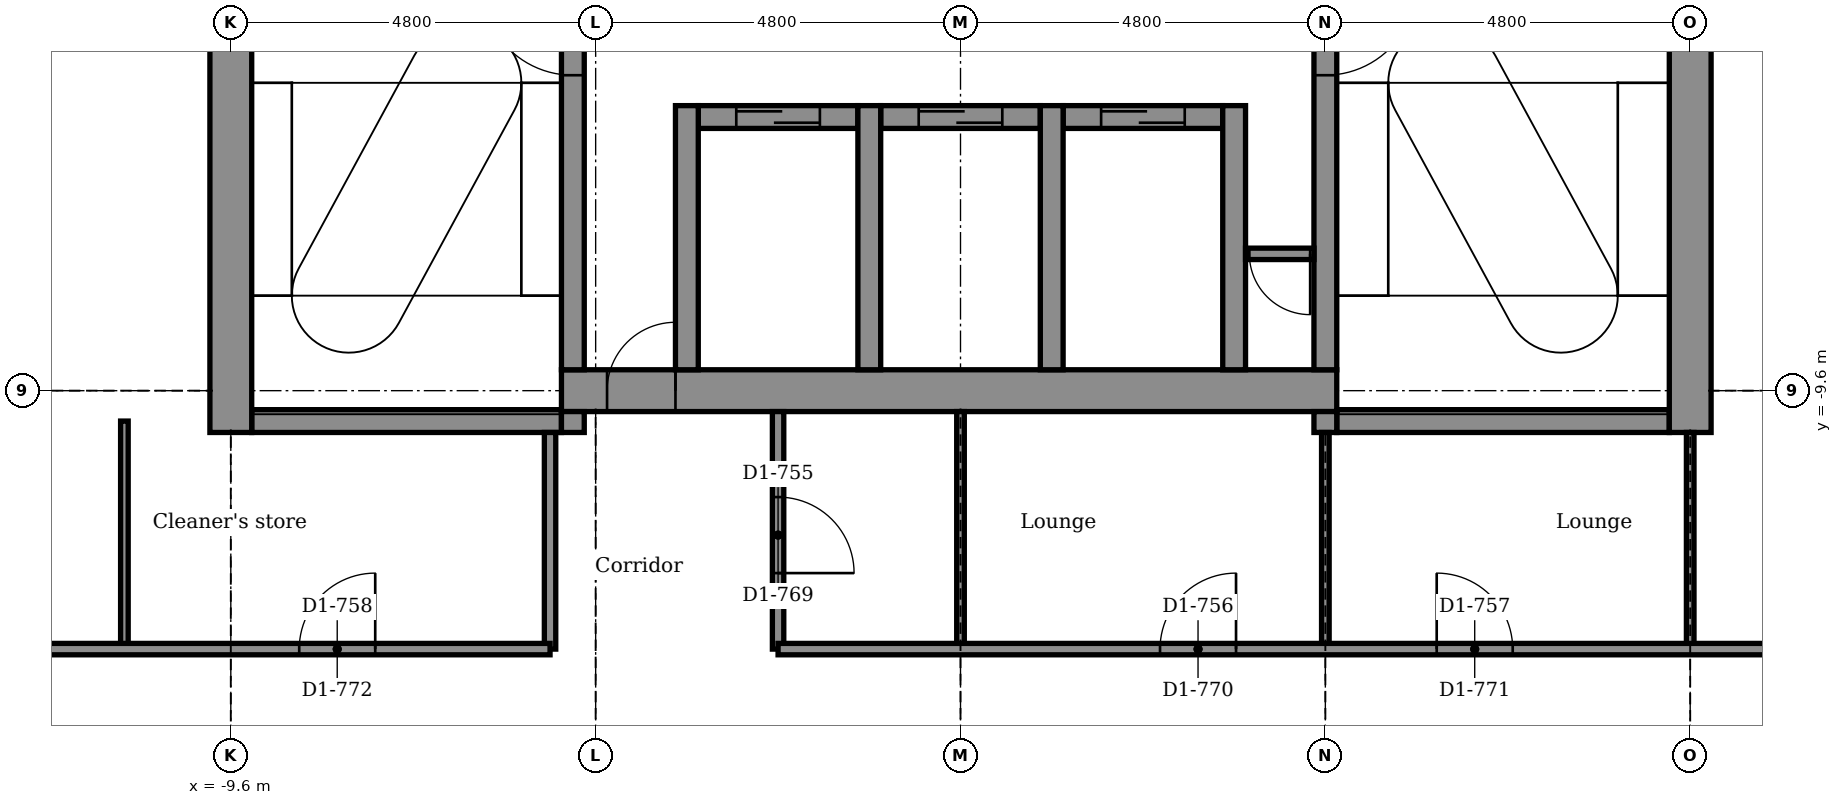
"""IFC4 building model, lengths in metres.
Left out: names, types, materials, properties, quantities, classifications, styles, units other than length and angle.
Written with IfcOpenShell. Run it as: python <this file> out.ifc"""

import sys

from ifc_helpers import new_model, si_unit, direction, frame, frame_2d, origin, place, context, subcontext, project, spatial, rectangle, extrude, element, fill, save


model = new_model("IFC4")
c1 = context("Model", 3, precision=1e-05, world=origin(), true_north=direction((0.0, 1.0)))
c2 = subcontext(c1, "Body", "Model", "MODEL_VIEW")
j1 = project(units=[si_unit("LENGTHUNIT", "METRE"), si_unit("PLANEANGLEUNIT", "RADIAN")], contexts=[c1])
p1 = place(None, origin())
s1 = spatial("IfcSite", under=j1, at=p1, CompositionType="ELEMENT")
p2 = place(p1, origin())
s2 = spatial("IfcBuilding", under=s1, at=p2, CompositionType="ELEMENT")
p3 = place(p2, frame((0.0, 0.0, 289.1)))
s3 = spatial("IfcBuildingStorey", under=s2, at=p3, CompositionType="ELEMENT", Elevation=289.1)
p4 = place(p3, frame((-9.325, -10.0, -0.15), z_axis=(0.0, 0.0, 1.0), x_axis=(1.0, 0.0, 0.0)))
e1 = element("IfcWall", 1, at=p4, inside=s3, PredefinedType="STANDARD", context=c2, shape_type="SweptSolid", body=[
    extrude(rectangle(XDim=4.075, YDim=0.3, at=frame_2d((2.038, 0.0))), origin(), (0.0, 0.0, 1.0), 3.9),
])
p5 = place(p3, frame((4.95, -10.0, -0.15), z_axis=(0.0, 0.0, 1.0), x_axis=(1.0, 0.0, 0.0)))
e2 = element("IfcWall", 2, at=p5, inside=s3, PredefinedType="STANDARD", context=c2, shape_type="SweptSolid", body=[
    extrude(rectangle(XDim=4.375, YDim=0.3, at=frame_2d((2.188, 0.0))), origin(), (0.0, 0.0, 1.0), 3.9),
])
p6 = place(p3, frame((-5.25, -9.6, -0.15), z_axis=(0.0, 0.0, 1.0), x_axis=(1.0, 0.0, 0.0)))
e3 = element("IfcWall", 3, at=p6, inside=s3, PredefinedType="SHEAR", context=c2, shape_type="SweptSolid", body=[
    extrude(rectangle(XDim=10.2, YDim=0.55, at=frame_2d((5.1, 0.0))), origin(), (0.0, 0.0, 1.0), 3.9),
])
p7 = place(p6, frame((0.6, 0.0, 0.15)))
e4 = element("IfcOpeningElement", 4, at=p7, cuts=e3, PredefinedType="OPENING", context=c2, shape_type="SweptSolid", body=[
    extrude(rectangle(XDim=0.9, YDim=2.1, at=frame_2d((0.45, 1.05))), frame((0.0, 0.285, 0.0), z_axis=(0.0, -1.0, 0.0), x_axis=(1.0, 0.0, 0.0)), (0.0, 0.0, 1.0), 0.57),
])
p8 = place(p3, frame((-3.45, -6.0, -0.15), z_axis=(0.0, 0.0, 1.0), x_axis=(1.0, 0.0, 0.0)))
e5 = element("IfcWall", 5, at=p8, inside=s3, PredefinedType="STANDARD", context=c2, shape_type="SweptSolid", body=[
    extrude(rectangle(XDim=2.1, YDim=0.3, at=frame_2d((1.05, 0.0))), origin(), (0.0, 0.0, 1.0), 3.9),
])
p9 = place(p8, frame((0.5, 0.0, 0.15)))
e6 = element("IfcOpeningElement", 6, at=p9, cuts=e5, PredefinedType="OPENING", context=c2, shape_type="SweptSolid", body=[
    extrude(rectangle(XDim=1.1, YDim=2.1, at=frame_2d((0.55, 1.05))), frame((0.0, 0.16, 0.0), z_axis=(0.0, -1.0, 0.0), x_axis=(1.0, 0.0, 0.0)), (0.0, 0.0, 1.0), 0.32),
])
p10 = place(p3, frame((-1.05, -6.0, -0.15), z_axis=(0.0, 0.0, 1.0), x_axis=(1.0, 0.0, 0.0)))
e7 = element("IfcWall", 7, at=p10, inside=s3, PredefinedType="STANDARD", context=c2, shape_type="SweptSolid", body=[
    extrude(rectangle(XDim=2.1, YDim=0.3, at=frame_2d((1.05, 0.0))), origin(), (0.0, 0.0, 1.0), 3.9),
])
p11 = place(p10, frame((0.5, 0.0, 0.15)))
e8 = element("IfcOpeningElement", 8, at=p11, cuts=e7, PredefinedType="OPENING", context=c2, shape_type="SweptSolid", body=[
    extrude(rectangle(XDim=1.1, YDim=2.1, at=frame_2d((0.55, 1.05))), frame((0.0, 0.16, 0.0), z_axis=(0.0, -1.0, 0.0), x_axis=(1.0, 0.0, 0.0)), (0.0, 0.0, 1.0), 0.32),
])
p12 = place(p3, frame((1.35, -6.0, -0.15), z_axis=(0.0, 0.0, 1.0), x_axis=(1.0, 0.0, 0.0)))
e9 = element("IfcWall", 9, at=p12, inside=s3, PredefinedType="STANDARD", context=c2, shape_type="SweptSolid", body=[
    extrude(rectangle(XDim=2.1, YDim=0.3, at=frame_2d((1.05, 0.0))), origin(), (0.0, 0.0, 1.0), 3.9),
])
p13 = place(p12, frame((0.5, 0.0, 0.15)))
e10 = element("IfcOpeningElement", 10, at=p13, cuts=e9, PredefinedType="OPENING", context=c2, shape_type="SweptSolid", body=[
    extrude(rectangle(XDim=1.1, YDim=2.1, at=frame_2d((0.55, 1.05))), frame((0.0, 0.16, 0.0), z_axis=(0.0, -1.0, 0.0), x_axis=(1.0, 0.0, 0.0)), (0.0, 0.0, 1.0), 0.32),
])
p14 = place(p3, frame((-9.6, -10.15, -0.15), z_axis=(0.0, 0.0, 1.0), x_axis=(0.0, 1.0, 0.0)))
e11 = element("IfcWall", 11, at=p14, inside=s3, PredefinedType="SHEAR", context=c2, shape_type="SweptSolid", body=[
    extrude(rectangle(XDim=7.6, YDim=0.55, at=frame_2d((3.8, 0.0))), origin(), (0.0, 0.0, 1.0), 3.9),
])
p15 = place(p3, frame((-5.1, -10.15, -0.15), z_axis=(0.0, 0.0, 1.0), x_axis=(0.0, 1.0, 0.0)))
e12 = element("IfcWall", 12, at=p15, inside=s3, PredefinedType="STANDARD", context=c2, shape_type="SweptSolid", body=[
    extrude(rectangle(XDim=0.275, YDim=0.3, at=frame_2d((0.137, 0.0))), origin(), (0.0, 0.0, 1.0), 3.9),
])
p16 = place(p3, frame((-5.1, -9.325, -0.15), z_axis=(0.0, 0.0, 1.0), x_axis=(0.0, 1.0, 0.0)))
e13 = element("IfcWall", 13, at=p16, inside=s3, PredefinedType="STANDARD", context=c2, shape_type="SweptSolid", body=[
    extrude(rectangle(XDim=7.075, YDim=0.3, at=frame_2d((3.538, 0.0))), origin(), (0.0, 0.0, 1.0), 3.9),
])
p17 = place(p16, frame((3.875, 0.0, 0.15)))
e14 = element("IfcOpeningElement", 14, at=p17, cuts=e13, PredefinedType="OPENING", context=c2, shape_type="SweptSolid", body=[
    extrude(rectangle(XDim=1.2, YDim=2.1, at=frame_2d((0.6, 1.05))), frame((0.0, 0.16, 0.0), z_axis=(0.0, -1.0, 0.0), x_axis=(1.0, 0.0, 0.0)), (0.0, 0.0, 1.0), 0.32),
])
for number, where, z_axis, x_axis in (
    (15, (-3.6, -9.325, -0.15), (0.0, 0.0, 1.0), (0.0, 1.0, 0.0)),
    (16, (-1.2, -9.325, -0.15), (0.0, 0.0, 1.0), (0.0, 1.0, 0.0)),
    (17, (1.2, -9.325, -0.15), (0.0, 0.0, 1.0), (0.0, 1.0, 0.0)),
    (18, (3.6, -9.325, -0.15), (0.0, 0.0, 1.0), (0.0, 1.0, 0.0)),
):
    element("IfcWall", number, at=place(p3, frame(where, z_axis=z_axis, x_axis=x_axis)), inside=s3, PredefinedType="STANDARD", context=c2, shape_type="SweptSolid", body=[
        extrude(rectangle(XDim=3.475, YDim=0.3, at=frame_2d((1.737, 0.0))), origin(), (0.0, 0.0, 1.0), 3.9),
    ])
p18 = place(p3, frame((4.8, -10.15, -0.15), z_axis=(0.0, 0.0, 1.0), x_axis=(0.0, 1.0, 0.0)))
e19 = element("IfcWall", 19, at=p18, inside=s3, PredefinedType="STANDARD", context=c2, shape_type="SweptSolid", body=[
    extrude(rectangle(XDim=0.275, YDim=0.3, at=frame_2d((0.137, 0.0))), origin(), (0.0, 0.0, 1.0), 3.9),
])
p19 = place(p3, frame((4.8, -9.325, -0.15), z_axis=(0.0, 0.0, 1.0), x_axis=(0.0, 1.0, 0.0)))
e20 = element("IfcWall", 20, at=p19, inside=s3, PredefinedType="STANDARD", context=c2, shape_type="SweptSolid", body=[
    extrude(rectangle(XDim=7.075, YDim=0.3, at=frame_2d((3.538, 0.0))), origin(), (0.0, 0.0, 1.0), 3.9),
])
p20 = place(p19, frame((3.875, 0.0, 0.15)))
e21 = element("IfcOpeningElement", 21, at=p20, cuts=e20, PredefinedType="OPENING", context=c2, shape_type="SweptSolid", body=[
    extrude(rectangle(XDim=1.2, YDim=2.1, at=frame_2d((0.6, 1.05))), frame((0.0, 0.16, 0.0), z_axis=(0.0, -1.0, 0.0), x_axis=(1.0, 0.0, 0.0)), (0.0, 0.0, 1.0), 0.32),
])
p21 = place(p3, frame((9.6, -10.15, -0.15), z_axis=(0.0, 0.0, 1.0), x_axis=(0.0, 1.0, 0.0)))
e22 = element("IfcWall", 22, at=p21, inside=s3, PredefinedType="SHEAR", context=c2, shape_type="SweptSolid", body=[
    extrude(rectangle(XDim=20.075, YDim=0.55, at=frame_2d((10.038, 0.0))), origin(), (0.0, 0.0, 1.0), 3.9),
])
for number, where, z_axis, x_axis in (
    (23, (9.6, -13.0, 0.0), (0.0, 0.0, 1.0), (0.0, 1.0, 0.0)),
    (24, (4.8, -13.0, 0.0), (0.0, 0.0, 1.0), (0.0, 1.0, 0.0)),
):
    element("IfcWall", number, at=place(p3, frame(where, z_axis=z_axis, x_axis=x_axis)), inside=s3, PredefinedType="PARTITIONING", context=c2, shape_type="SweptSolid", body=[
        extrude(rectangle(XDim=2.85, YDim=0.1, at=frame_2d((1.425, 0.0))), origin(), (0.0, 0.0, 1.0), 3.293),
    ])
p22 = place(p3, frame((0.0, -13.0, 0.0), z_axis=(0.0, 0.0, 1.0), x_axis=(0.0, 1.0, 0.0)))
e25 = element("IfcWall", 25, at=p22, inside=s3, PredefinedType="PARTITIONING", context=c2, shape_type="SweptSolid", body=[
    extrude(rectangle(XDim=3.125, YDim=0.1, at=frame_2d((1.562, 0.0))), origin(), (0.0, 0.0, 1.0), 3.217),
])
p23 = place(p3, frame((-2.4, -13.0, 0.0), z_axis=(0.0, 0.0, 1.0), x_axis=(0.0, 1.0, 0.0)))
e26 = element("IfcWall", 26, at=p23, inside=s3, PredefinedType="PARTITIONING", context=c2, shape_type="SweptSolid", body=[
    extrude(rectangle(XDim=3.125, YDim=0.15, at=frame_2d((1.562, 0.0))), origin(), (0.0, 0.0, 1.0), 3.75),
])
p24 = place(p23, frame((1.0, 0.0, 0.0)))
e27 = element("IfcOpeningElement", 27, at=p24, cuts=e26, PredefinedType="OPENING", context=c2, shape_type="SweptSolid", body=[
    extrude(rectangle(XDim=1.0, YDim=2.1, at=frame_2d((0.5, 1.05))), frame((0.0, 0.085, 0.0), z_axis=(0.0, -1.0, 0.0), x_axis=(1.0, 0.0, 0.0)), (0.0, 0.0, 1.0), 0.17),
])
p25 = place(p3, frame((-5.4, -13.0, 0.0), z_axis=(0.0, 0.0, 1.0), x_axis=(0.0, 1.0, 0.0)))
e28 = element("IfcWall", 28, at=p25, inside=s3, PredefinedType="PARTITIONING", context=c2, shape_type="SweptSolid", body=[
    extrude(rectangle(XDim=2.85, YDim=0.15, at=frame_2d((1.425, 0.0))), origin(), (0.0, 0.0, 1.0), 3.75),
])
p26 = place(p3, frame((-11.0, -13.0, 0.0), z_axis=(0.0, 0.0, 1.0), x_axis=(0.0, 1.0, 0.0)))
e29 = element("IfcWall", 29, at=p26, inside=s3, PredefinedType="PARTITIONING", context=c2, shape_type="SweptSolid", body=[
    extrude(rectangle(XDim=3.0, YDim=0.1, at=frame_2d((1.5, 0.0))), origin(), (0.0, 0.0, 1.0), 3.75),
])
p27 = place(p3, frame((-14.624, -13.0, 0.0), z_axis=(0.0, 0.0, 1.0), x_axis=(1.0, 0.0, 0.0)))
e30 = element("IfcWall", 30, at=p27, inside=s3, PredefinedType="PARTITIONING", context=c2, shape_type="SweptSolid", body=[
    extrude(rectangle(XDim=9.224, YDim=0.15, at=frame_2d((4.612, 0.0))), origin(), (0.0, 0.0, 1.0), 3.75),
])
p28 = place(p27, frame((5.924, 0.0, 0.0)))
e31 = element("IfcOpeningElement", 31, at=p28, cuts=e30, PredefinedType="OPENING", context=c2, shape_type="SweptSolid", body=[
    extrude(rectangle(XDim=1.0, YDim=2.1, at=frame_2d((0.5, 1.05))), frame((0.0, 0.085, 0.0), z_axis=(0.0, -1.0, 0.0), x_axis=(1.0, 0.0, 0.0)), (0.0, 0.0, 1.0), 0.17),
])
p29 = place(p3, frame((-2.4, -13.0, 0.0), z_axis=(0.0, 0.0, 1.0), x_axis=(1.0, 0.0, 0.0)))
e32 = element("IfcWall", 32, at=p29, inside=s3, PredefinedType="PARTITIONING", context=c2, shape_type="SweptSolid", body=[
    extrude(rectangle(XDim=17.024, YDim=0.15, at=frame_2d((8.512, 0.0))), origin(), (0.0, 0.0, 1.0), 3.75),
])
p30 = place(p29, frame((5.025, 0.0, 0.0)))
e33 = element("IfcOpeningElement", 33, at=p30, cuts=e32, PredefinedType="OPENING", context=c2, shape_type="SweptSolid", body=[
    extrude(rectangle(XDim=1.0, YDim=2.1, at=frame_2d((0.5, 1.05))), frame((0.0, 0.085, 0.0), z_axis=(0.0, -1.0, 0.0), x_axis=(1.0, 0.0, 0.0)), (0.0, 0.0, 1.0), 0.17),
])
p31 = place(p29, frame((8.665, 0.0, 0.0)))
e34 = element("IfcOpeningElement", 34, at=p31, cuts=e32, PredefinedType="OPENING", context=c2, shape_type="SweptSolid", body=[
    extrude(rectangle(XDim=1.0, YDim=2.1, at=frame_2d((0.5, 1.05))), frame((0.0, 0.085, 0.0), z_axis=(0.0, -1.0, 0.0), x_axis=(1.0, 0.0, 0.0)), (0.0, 0.0, 1.0), 0.17),
])
p32 = place(p3, frame((3.75, -7.8, 0.0), z_axis=(0.0, 0.0, 1.0), x_axis=(1.0, 0.0, 0.0)))
e35 = element("IfcWall", 35, at=p32, inside=s3, PredefinedType="PARTITIONING", context=c2, shape_type="SweptSolid", body=[
    extrude(rectangle(XDim=0.9, YDim=0.15, at=frame_2d((0.45, 0.0))), origin(), (0.0, 0.0, 1.0), 3.75),
])
p33 = place(p32, frame((0.05, 0.0, 0.0)))
e36 = element("IfcOpeningElement", 36, at=p33, cuts=e35, PredefinedType="OPENING", context=c2, shape_type="SweptSolid", body=[
    extrude(rectangle(XDim=0.8, YDim=2.1, at=frame_2d((0.4, 1.05))), frame((0.0, 0.085, 0.0), z_axis=(0.0, -1.0, 0.0), x_axis=(1.0, 0.0, 0.0)), (0.0, 0.0, 1.0), 0.17),
])
p34 = place(p33, frame((0.8, 0.0, 0.0), z_axis=(0.0, 0.0, 1.0), x_axis=(-1.0, 0.0, 0.0)))
e37 = element("IfcDoor", 37, at=p34, inside=s3, OperationType="SINGLE_SWING_RIGHT", PredefinedType="DOOR", context=c2, shape_type="SweptSolid", body=[
    extrude(rectangle(XDim=0.8, YDim=2.1, at=frame_2d((0.4, 1.05))), frame((0.0, 0.025, 0.0), z_axis=(0.0, -1.0, 0.0), x_axis=(1.0, 0.0, 0.0)), (0.0, 0.0, 1.0), 0.05),
])
fill(e36, e37)
p35 = place(p24, frame((1.0, 0.0, 0.0), z_axis=(0.0, 0.0, 1.0), x_axis=(-1.0, 0.0, 0.0)))
e38 = element("IfcDoor", 38, at=p35, inside=s3, OperationType="SINGLE_SWING_LEFT", PredefinedType="DOOR", context=c2, shape_type="SweptSolid", body=[
    extrude(rectangle(XDim=1.0, YDim=2.1, at=frame_2d((0.5, 1.05))), frame((0.0, 0.025, 0.0), z_axis=(0.0, -1.0, 0.0), x_axis=(1.0, 0.0, 0.0)), (0.0, 0.0, 1.0), 0.05),
])
fill(e27, e38)
p36 = place(p30, origin())
e39 = element("IfcDoor", 39, at=p36, inside=s3, OperationType="SINGLE_SWING_RIGHT", PredefinedType="DOOR", context=c2, shape_type="SweptSolid", body=[
    extrude(rectangle(XDim=1.0, YDim=2.1, at=frame_2d((0.5, 1.05))), frame((0.0, 0.025, 0.0), z_axis=(0.0, -1.0, 0.0), x_axis=(1.0, 0.0, 0.0)), (0.0, 0.0, 1.0), 0.05),
])
fill(e33, e39)
p37 = place(p31, origin())
e40 = element("IfcDoor", 40, at=p37, inside=s3, OperationType="SINGLE_SWING_LEFT", PredefinedType="DOOR", context=c2, shape_type="SweptSolid", body=[
    extrude(rectangle(XDim=1.0, YDim=2.1, at=frame_2d((0.5, 1.05))), frame((0.0, 0.025, 0.0), z_axis=(0.0, -1.0, 0.0), x_axis=(1.0, 0.0, 0.0)), (0.0, 0.0, 1.0), 0.05),
])
fill(e34, e40)
p38 = place(p28, origin())
e41 = element("IfcDoor", 41, at=p38, inside=s3, OperationType="SINGLE_SWING_RIGHT", PredefinedType="DOOR", context=c2, shape_type="SweptSolid", body=[
    extrude(rectangle(XDim=1.0, YDim=2.1, at=frame_2d((0.5, 1.05))), frame((0.0, 0.025, 0.0), z_axis=(0.0, -1.0, 0.0), x_axis=(1.0, 0.0, 0.0)), (0.0, 0.0, 1.0), 0.05),
])
fill(e31, e41)
p39 = place(p9, origin())
e42 = element("IfcDoor", 42, at=p39, inside=s3, OperationType="DOUBLE_DOOR_SLIDING", PredefinedType="DOOR", context=c2, shape_type="SweptSolid", body=[
    extrude(rectangle(XDim=1.1, YDim=2.1, at=frame_2d((0.55, 1.05))), frame((0.0, 0.025, 0.0), z_axis=(0.0, -1.0, 0.0), x_axis=(1.0, 0.0, 0.0)), (0.0, 0.0, 1.0), 0.05),
])
fill(e6, e42)
p40 = place(p11, origin())
e43 = element("IfcDoor", 43, at=p40, inside=s3, OperationType="DOUBLE_DOOR_SLIDING", PredefinedType="DOOR", context=c2, shape_type="SweptSolid", body=[
    extrude(rectangle(XDim=1.1, YDim=2.1, at=frame_2d((0.55, 1.05))), frame((0.0, 0.025, 0.0), z_axis=(0.0, -1.0, 0.0), x_axis=(1.0, 0.0, 0.0)), (0.0, 0.0, 1.0), 0.05),
])
fill(e8, e43)
p41 = place(p13, origin())
e44 = element("IfcDoor", 44, at=p41, inside=s3, OperationType="DOUBLE_DOOR_SLIDING", PredefinedType="DOOR", context=c2, shape_type="SweptSolid", body=[
    extrude(rectangle(XDim=1.1, YDim=2.1, at=frame_2d((0.55, 1.05))), frame((0.0, 0.025, 0.0), z_axis=(0.0, -1.0, 0.0), x_axis=(1.0, 0.0, 0.0)), (0.0, 0.0, 1.0), 0.05),
])
fill(e10, e44)
p42 = place(p17, origin())
e45 = element("IfcDoor", 45, at=p42, inside=s3, OperationType="SINGLE_SWING_RIGHT", PredefinedType="DOOR", context=c2, shape_type="SweptSolid", body=[
    extrude(rectangle(XDim=1.2, YDim=2.1, at=frame_2d((0.6, 1.05))), frame((0.0, 0.025, 0.0), z_axis=(0.0, -1.0, 0.0), x_axis=(1.0, 0.0, 0.0)), (0.0, 0.0, 1.0), 0.05),
])
fill(e14, e45)
p43 = place(p20, frame((1.2, 0.0, 0.0), z_axis=(0.0, 0.0, 1.0), x_axis=(-1.0, 0.0, 0.0)))
e46 = element("IfcDoor", 46, at=p43, inside=s3, OperationType="SINGLE_SWING_RIGHT", PredefinedType="DOOR", context=c2, shape_type="SweptSolid", body=[
    extrude(rectangle(XDim=1.2, YDim=2.1, at=frame_2d((0.6, 1.05))), frame((0.0, 0.025, 0.0), z_axis=(0.0, -1.0, 0.0), x_axis=(1.0, 0.0, 0.0)), (0.0, 0.0, 1.0), 0.05),
])
fill(e21, e46)
p44 = place(p7, origin())
e47 = element("IfcDoor", 47, at=p44, inside=s3, OperationType="SINGLE_SWING_RIGHT", PredefinedType="DOOR", context=c2, shape_type="SweptSolid", body=[
    extrude(rectangle(XDim=0.9, YDim=2.1, at=frame_2d((0.45, 1.05))), frame((0.0, 0.025, 0.0), z_axis=(0.0, -1.0, 0.0), x_axis=(1.0, 0.0, 0.0)), (0.0, 0.0, 1.0), 0.05),
])
fill(e4, e47)
save(model, sys.argv[1])
